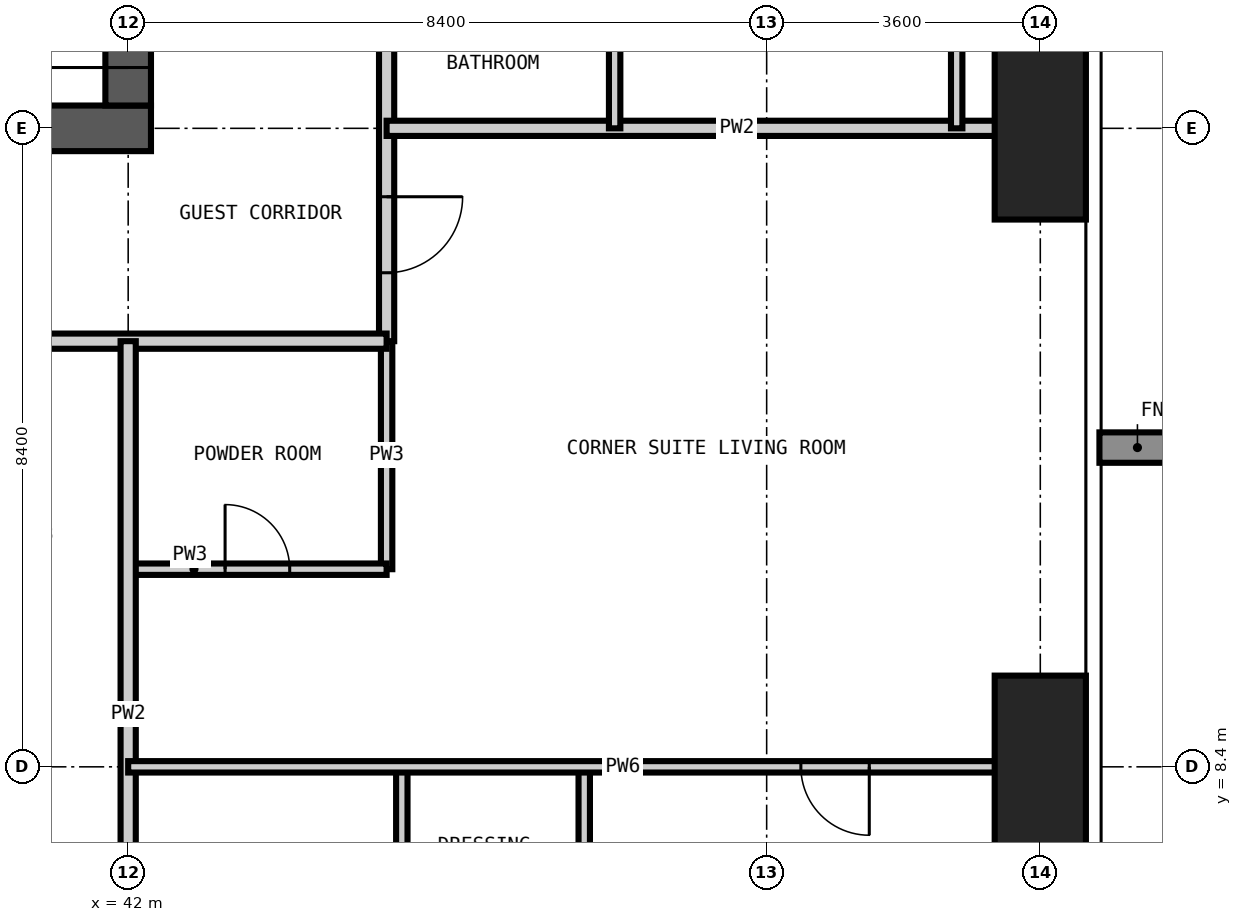
"""IFC4 building model, lengths in metres.
Left out: names, types, materials, properties, quantities, classifications, styles, units other than length and angle.
Written with IfcOpenShell. Run it as: python <this file> out.ifc"""

import sys

from ifc_helpers import new_model, si_unit, direction, frame, frame_2d, origin, origin_2d, place, context, subcontext, project, spatial, rectangle, extrude, element, fill, save


model = new_model("IFC4")
c1 = context("Model", 3, precision=1e-05, world=origin(), true_north=direction((0.0, 1.0)))
c2 = subcontext(c1, "Body", "Model", "MODEL_VIEW")
j1 = project(units=[si_unit("LENGTHUNIT", "METRE"), si_unit("PLANEANGLEUNIT", "RADIAN")], contexts=[c1])
p1 = place(None, origin())
s1 = spatial("IfcSite", under=j1, at=p1, CompositionType="ELEMENT")
p2 = place(p1, origin())
s2 = spatial("IfcBuilding", under=s1, at=p2, CompositionType="ELEMENT")
p3 = place(p2, frame((0.0, 0.0, 187.8)))
s3 = spatial("IfcBuildingStorey", under=s2, at=p3, CompositionType="ELEMENT", Elevation=187.8)
for number, where, z_axis, x_axis in (
    (1, (54.0, 8.4, -0.35), (0.0, 0.0, 1.0), (1.0, 0.0, 0.0)),
    (2, (54.0, 16.8, -0.35), (0.0, 0.0, 1.0), (1.0, 0.0, 0.0)),
):
    element("IfcColumn", number, at=place(p3, frame(where, z_axis=z_axis, x_axis=x_axis)), inside=s3, PredefinedType="COLUMN", context=c2, shape_type="SweptSolid", body=[
        extrude(rectangle(XDim=1.2, YDim=2.4, at=origin_2d()), origin(), (0.0, 0.0, 1.0), 3.6),
    ])
p4 = place(p3, frame((16.5, 16.8, -0.35), z_axis=(0.0, 0.0, 1.0), x_axis=(1.0, 0.0, 0.0)))
e3 = element("IfcWall", 3, at=p4, inside=s3, PredefinedType="SHEAR", context=c2, shape_type="SweptSolid", body=[
    extrude(rectangle(XDim=25.8, YDim=0.6, at=frame_2d((12.9, 0.0))), origin(), (0.0, 0.0, 1.0), 3.6),
])
p5 = place(p4, frame((12.4, 0.0, 0.35)))
e4 = element("IfcOpeningElement", 4, at=p5, cuts=e3, PredefinedType="OPENING", context=c2, shape_type="SweptSolid", body=[
    extrude(rectangle(XDim=1.0, YDim=2.1, at=frame_2d((0.5, 1.05))), frame((0.0, 0.31, 0.0), z_axis=(0.0, -1.0, 0.0), x_axis=(1.0, 0.0, 0.0)), (0.0, 0.0, 1.0), 0.62),
])
p6 = place(p4, frame((18.7, 0.0, 0.35)))
e5 = element("IfcOpeningElement", 5, at=p6, cuts=e3, PredefinedType="OPENING", context=c2, shape_type="SweptSolid", body=[
    extrude(rectangle(XDim=1.0, YDim=2.1, at=frame_2d((0.5, 1.05))), frame((0.0, 0.31, 0.0), z_axis=(0.0, -1.0, 0.0), x_axis=(1.0, 0.0, 0.0)), (0.0, 0.0, 1.0), 0.62),
])
p7 = place(p3, frame((42.0, 17.1, -0.35), z_axis=(0.0, 0.0, 1.0), x_axis=(0.0, 1.0, 0.0)))
e6 = element("IfcWall", 6, at=p7, inside=s3, PredefinedType="SHEAR", context=c2, shape_type="SweptSolid", body=[
    extrude(rectangle(XDim=24.6, YDim=0.6, at=frame_2d((12.3, 0.0))), origin(), (0.0, 0.0, 1.0), 3.6),
])
p8 = place(p7, frame((0.5, 0.0, 0.35)))
e7 = element("IfcOpeningElement", 7, at=p8, cuts=e6, PredefinedType="OPENING", context=c2, shape_type="SweptSolid", body=[
    extrude(rectangle(XDim=1.2, YDim=2.2, at=frame_2d((0.6, 1.1))), frame((0.0, 0.31, 0.0), z_axis=(0.0, -1.0, 0.0), x_axis=(1.0, 0.0, 0.0)), (0.0, 0.0, 1.0), 0.62),
])
p9 = place(p7, frame((11.8, 0.0, 0.35)))
e8 = element("IfcOpeningElement", 8, at=p9, cuts=e6, PredefinedType="OPENING", context=c2, shape_type="SweptSolid", body=[
    extrude(rectangle(XDim=1.0, YDim=2.1, at=frame_2d((0.5, 1.05))), frame((0.0, 0.31, 0.0), z_axis=(0.0, -1.0, 0.0), x_axis=(1.0, 0.0, 0.0)), (0.0, 0.0, 1.0), 0.62),
])
p10 = place(p7, frame((20.2, 0.0, 0.35)))
e9 = element("IfcOpeningElement", 9, at=p10, cuts=e6, PredefinedType="OPENING", context=c2, shape_type="SweptSolid", body=[
    extrude(rectangle(XDim=1.0, YDim=2.1, at=frame_2d((0.5, 1.05))), frame((0.0, 0.31, 0.0), z_axis=(0.0, -1.0, 0.0), x_axis=(1.0, 0.0, 0.0)), (0.0, 0.0, 1.0), 0.62),
])
p11 = place(p3, frame((45.4, 11.0, 0.0), z_axis=(0.0, 0.0, 1.0), x_axis=(0.0, 1.0, 0.0)))
e10 = element("IfcWall", 10, at=p11, inside=s3, PredefinedType="PARTITIONING", context=c2, shape_type="SweptSolid", body=[
    extrude(rectangle(XDim=3.0, YDim=0.15, at=frame_2d((1.5, 0.0))), origin(), (0.0, 0.0, 1.0), 3.25),
])
p12 = place(p3, frame((42.0, 11.0, 0.0), z_axis=(0.0, 0.0, 1.0), x_axis=(1.0, 0.0, 0.0)))
e11 = element("IfcWall", 11, at=p12, inside=s3, PredefinedType="PARTITIONING", context=c2, shape_type="SweptSolid", body=[
    extrude(rectangle(XDim=3.4, YDim=0.15, at=frame_2d((1.7, 0.0))), origin(), (0.0, 0.0, 1.0), 3.25),
])
p13 = place(p12, frame((1.275, 0.0, 0.0)))
e12 = element("IfcOpeningElement", 12, at=p13, cuts=e11, PredefinedType="OPENING", context=c2, shape_type="SweptSolid", body=[
    extrude(rectangle(XDim=0.85, YDim=2.1, at=frame_2d((0.425, 1.05))), frame((0.0, 0.085, 0.0), z_axis=(0.0, -1.0, 0.0), x_axis=(1.0, 0.0, 0.0)), (0.0, 0.0, 1.0), 0.17),
])
p14 = place(p3, frame((45.4, 44.2, 0.0), z_axis=(0.0, 0.0, 1.0), x_axis=(0.0, -1.0, 0.0)))
e13 = element("IfcWall", 13, at=p14, inside=s3, PredefinedType="PARTITIONING", context=c2, shape_type="SweptSolid", body=[
    extrude(rectangle(XDim=30.2, YDim=0.2, at=frame_2d((15.1, 0.0))), origin(), (0.0, 0.0, 1.0), 3.25),
])
p15 = place(p14, frame((21.8, 0.0, 0.0)))
e14 = element("IfcOpeningElement", 14, at=p15, cuts=e13, PredefinedType="OPENING", context=c2, shape_type="SweptSolid", body=[
    extrude(rectangle(XDim=1.0, YDim=2.2, at=frame_2d((0.5, 1.1))), frame((0.0, 0.11, 0.0), z_axis=(0.0, -1.0, 0.0), x_axis=(1.0, 0.0, 0.0)), (0.0, 0.0, 1.0), 0.22),
])
p16 = place(p14, frame((11.0, 0.0, 0.0)))
e15 = element("IfcOpeningElement", 15, at=p16, cuts=e13, PredefinedType="OPENING", context=c2, shape_type="SweptSolid", body=[
    extrude(rectangle(XDim=1.0, YDim=2.2, at=frame_2d((0.5, 1.1))), frame((0.0, 0.11, 0.0), z_axis=(0.0, -1.0, 0.0), x_axis=(1.0, 0.0, 0.0)), (0.0, 0.0, 1.0), 0.22),
])
p17 = place(p14, frame((3.8, 0.0, 0.0)))
e16 = element("IfcOpeningElement", 16, at=p17, cuts=e13, PredefinedType="OPENING", context=c2, shape_type="SweptSolid", body=[
    extrude(rectangle(XDim=1.0, YDim=2.2, at=frame_2d((0.5, 1.1))), frame((0.0, 0.11, 0.0), z_axis=(0.0, -1.0, 0.0), x_axis=(1.0, 0.0, 0.0)), (0.0, 0.0, 1.0), 0.22),
])
p18 = place(p14, frame((28.3, 0.0, 0.0)))
e17 = element("IfcOpeningElement", 17, at=p18, cuts=e13, PredefinedType="OPENING", context=c2, shape_type="SweptSolid", body=[
    extrude(rectangle(XDim=1.0, YDim=2.2, at=frame_2d((0.5, 1.1))), frame((0.0, 0.11, 0.0), z_axis=(0.0, -1.0, 0.0), x_axis=(1.0, 0.0, 0.0)), (0.0, 0.0, 1.0), 0.22),
])
p19 = place(p14, frame((0.6, 0.0, 0.0)))
e18 = element("IfcOpeningElement", 18, at=p19, cuts=e13, PredefinedType="OPENING", context=c2, shape_type="SweptSolid", body=[
    extrude(rectangle(XDim=1.0, YDim=2.2, at=frame_2d((0.5, 1.1))), frame((0.0, 0.11, 0.0), z_axis=(0.0, -1.0, 0.0), x_axis=(1.0, 0.0, 0.0)), (0.0, 0.0, 1.0), 0.22),
])
p20 = place(p3, frame((45.4, 14.0, 0.0), z_axis=(0.0, 0.0, 1.0), x_axis=(-1.0, 0.0, 0.0)))
e19 = element("IfcWall", 19, at=p20, inside=s3, PredefinedType="PARTITIONING", context=c2, shape_type="SweptSolid", body=[
    extrude(rectangle(XDim=31.4, YDim=0.2, at=frame_2d((15.7, 0.0))), origin(), (0.0, 0.0, 1.0), 3.25),
])
p21 = place(p20, frame((26.0, 0.0, 0.0)))
e20 = element("IfcOpeningElement", 20, at=p21, cuts=e19, PredefinedType="OPENING", context=c2, shape_type="SweptSolid", body=[
    extrude(rectangle(XDim=1.0, YDim=2.2, at=frame_2d((0.5, 1.1))), frame((0.0, 0.11, 0.0), z_axis=(0.0, -1.0, 0.0), x_axis=(1.0, 0.0, 0.0)), (0.0, 0.0, 1.0), 0.22),
])
p22 = place(p20, frame((19.7, 0.0, 0.0)))
e21 = element("IfcOpeningElement", 21, at=p22, cuts=e19, PredefinedType="OPENING", context=c2, shape_type="SweptSolid", body=[
    extrude(rectangle(XDim=1.0, YDim=2.2, at=frame_2d((0.5, 1.1))), frame((0.0, 0.11, 0.0), z_axis=(0.0, -1.0, 0.0), x_axis=(1.0, 0.0, 0.0)), (0.0, 0.0, 1.0), 0.22),
])
p23 = place(p20, frame((11.3, 0.0, 0.0)))
e22 = element("IfcOpeningElement", 22, at=p23, cuts=e19, PredefinedType="OPENING", context=c2, shape_type="SweptSolid", body=[
    extrude(rectangle(XDim=1.0, YDim=2.2, at=frame_2d((0.5, 1.1))), frame((0.0, 0.11, 0.0), z_axis=(0.0, -1.0, 0.0), x_axis=(1.0, 0.0, 0.0)), (0.0, 0.0, 1.0), 0.22),
])
p24 = place(p20, frame((5.0, 0.0, 0.0)))
e23 = element("IfcOpeningElement", 23, at=p24, cuts=e19, PredefinedType="OPENING", context=c2, shape_type="SweptSolid", body=[
    extrude(rectangle(XDim=1.0, YDim=2.2, at=frame_2d((0.5, 1.1))), frame((0.0, 0.11, 0.0), z_axis=(0.0, -1.0, 0.0), x_axis=(1.0, 0.0, 0.0)), (0.0, 0.0, 1.0), 0.22),
])
p25 = place(p3, frame((42.0, 4.182, 0.0), z_axis=(0.0, 0.0, 1.0), x_axis=(0.0, 1.0, 0.0)))
e24 = element("IfcWall", 24, at=p25, inside=s3, PredefinedType="PARTITIONING", context=c2, shape_type="SweptSolid", body=[
    extrude(rectangle(XDim=9.818, YDim=0.2, at=frame_2d((4.909, 0.0))), origin(), (0.0, 0.0, 1.0), 3.25),
])
p26 = place(p3, frame((45.4, 16.8, 0.0), z_axis=(0.0, 0.0, 1.0), x_axis=(1.0, 0.0, 0.0)))
e25 = element("IfcWall", 25, at=p26, inside=s3, PredefinedType="PARTITIONING", context=c2, shape_type="SweptSolid", body=[
    extrude(rectangle(XDim=9.218, YDim=0.2, at=frame_2d((4.609, 0.0))), origin(), (0.0, 0.0, 1.0), 3.25),
])
p27 = place(p3, frame((45.6, 5.4, 0.0), z_axis=(0.0, 0.0, 1.0), x_axis=(0.0, 1.0, 0.0)))
e26 = element("IfcWall", 26, at=p27, inside=s3, PredefinedType="PARTITIONING", context=c2, shape_type="SweptSolid", body=[
    extrude(rectangle(XDim=3.0, YDim=0.15, at=frame_2d((1.5, 0.0))), origin(), (0.0, 0.0, 1.0), 3.25),
])
p28 = place(p3, frame((48.0, 5.4, 0.0), z_axis=(0.0, 0.0, 1.0), x_axis=(0.0, 1.0, 0.0)))
e27 = element("IfcWall", 27, at=p28, inside=s3, PredefinedType="PARTITIONING", context=c2, shape_type="SweptSolid", body=[
    extrude(rectangle(XDim=3.0, YDim=0.15, at=frame_2d((1.5, 0.0))), origin(), (0.0, 0.0, 1.0), 3.25),
])
p29 = place(p28, frame((1.05, 0.0, 0.0)))
e28 = element("IfcOpeningElement", 28, at=p29, cuts=e27, PredefinedType="OPENING", context=c2, shape_type="SweptSolid", body=[
    extrude(rectangle(XDim=0.9, YDim=2.1, at=frame_2d((0.45, 1.05))), frame((0.0, 0.085, 0.0), z_axis=(0.0, -1.0, 0.0), x_axis=(1.0, 0.0, 0.0)), (0.0, 0.0, 1.0), 0.17),
])
for number, where, z_axis, x_axis in (
    (29, (48.4, 16.8, 0.0), (0.0, 0.0, 1.0), (0.0, 1.0, 0.0)),
    (30, (52.9, 16.8, 0.0), (0.0, 0.0, 1.0), (0.0, 1.0, 0.0)),
):
    element("IfcWall", number, at=place(p3, frame(where, z_axis=z_axis, x_axis=x_axis)), inside=s3, PredefinedType="PARTITIONING", context=c2, shape_type="SweptSolid", body=[
        extrude(rectangle(XDim=3.0, YDim=0.15, at=frame_2d((1.5, 0.0))), origin(), (0.0, 0.0, 1.0), 3.25),
    ])
p30 = place(p3, frame((42.0, 8.4, 0.0), z_axis=(0.0, 0.0, 1.0), x_axis=(1.0, 0.0, 0.0)))
e31 = element("IfcWall", 31, at=p30, inside=s3, PredefinedType="PARTITIONING", context=c2, shape_type="SweptSolid", body=[
    extrude(rectangle(XDim=12.618, YDim=0.15, at=frame_2d((6.309, 0.0))), origin(), (0.0, 0.0, 1.0), 3.25),
])
p31 = place(p30, frame((8.85, 0.0, 0.0)))
e32 = element("IfcOpeningElement", 32, at=p31, cuts=e31, PredefinedType="OPENING", context=c2, shape_type="SweptSolid", body=[
    extrude(rectangle(XDim=0.9, YDim=2.1, at=frame_2d((0.45, 1.05))), frame((0.0, 0.085, 0.0), z_axis=(0.0, -1.0, 0.0), x_axis=(1.0, 0.0, 0.0)), (0.0, 0.0, 1.0), 0.17),
])
p32 = place(p8, origin())
e33 = element("IfcDoor", 33, at=p32, inside=s3, OperationType="SINGLE_SWING_LEFT", PredefinedType="DOOR", context=c2, shape_type="SweptSolid", body=[
    extrude(rectangle(XDim=1.2, YDim=2.2, at=frame_2d((0.6, 1.1))), frame((0.0, 0.025, 0.0), z_axis=(0.0, -1.0, 0.0), x_axis=(1.0, 0.0, 0.0)), (0.0, 0.0, 1.0), 0.05),
])
fill(e7, e33)
p33 = place(p18, origin())
e34 = element("IfcDoor", 34, at=p33, inside=s3, OperationType="SINGLE_SWING_LEFT", PredefinedType="DOOR", context=c2, shape_type="SweptSolid", body=[
    extrude(rectangle(XDim=1.0, YDim=2.2, at=frame_2d((0.5, 1.1))), frame((0.0, 0.025, 0.0), z_axis=(0.0, -1.0, 0.0), x_axis=(1.0, 0.0, 0.0)), (0.0, 0.0, 1.0), 0.05),
])
fill(e17, e34)
p34 = place(p13, origin())
e35 = element("IfcDoor", 35, at=p34, inside=s3, OperationType="SINGLE_SWING_LEFT", PredefinedType="DOOR", context=c2, shape_type="SweptSolid", body=[
    extrude(rectangle(XDim=0.85, YDim=2.1, at=frame_2d((0.425, 1.05))), frame((0.0, 0.025, 0.0), z_axis=(0.0, -1.0, 0.0), x_axis=(1.0, 0.0, 0.0)), (0.0, 0.0, 1.0), 0.05),
])
fill(e12, e35)
p35 = place(p31, frame((0.9, 0.0, 0.0), z_axis=(0.0, 0.0, 1.0), x_axis=(-1.0, 0.0, 0.0)))
e36 = element("IfcDoor", 36, at=p35, inside=s3, OperationType="SINGLE_SWING_LEFT", PredefinedType="DOOR", context=c2, shape_type="SweptSolid", body=[
    extrude(rectangle(XDim=0.9, YDim=2.1, at=frame_2d((0.45, 1.05))), frame((0.0, 0.025, 0.0), z_axis=(0.0, -1.0, 0.0), x_axis=(1.0, 0.0, 0.0)), (0.0, 0.0, 1.0), 0.05),
])
fill(e32, e36)
save(model, sys.argv[1])
